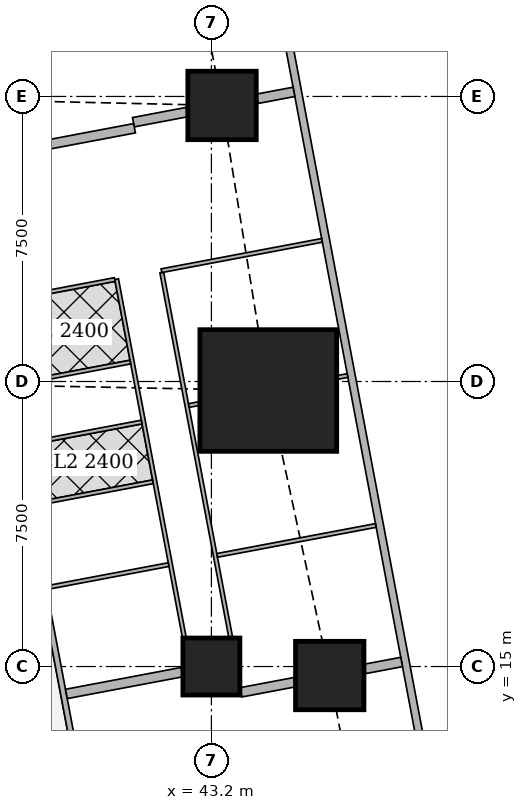
"""IFC4 building model, lengths in metres.
Left out: names, types, materials, properties, quantities, classifications, styles, units other than length and angle.
Written with IfcOpenShell. Run it as: python <this file> out.ifc"""

import sys

from ifc_helpers import new_model, si_unit, direction, frame, frame_2d, origin, origin_2d, place, context, subcontext, project, spatial, rectangle, extrude, element, fill, save


model = new_model("IFC4")
c1 = context("Model", 3, precision=1e-05, world=origin(), true_north=direction((0.0, 1.0)))
c2 = subcontext(c1, "Body", "Model", "MODEL_VIEW")
j1 = project(units=[si_unit("LENGTHUNIT", "METRE"), si_unit("PLANEANGLEUNIT", "RADIAN")], contexts=[c1])
p1 = place(None, origin())
s1 = spatial("IfcSite", under=j1, at=p1, CompositionType="ELEMENT")
p2 = place(p1, origin())
s2 = spatial("IfcBuilding", under=s1, at=p2, CompositionType="ELEMENT")
p3 = place(p2, frame((0.0, 0.0, 147.05)))
s3 = spatial("IfcBuildingStorey", under=s2, at=p3, CompositionType="ELEMENT", Elevation=147.05)
p4 = place(p3, frame((43.2, 15.0, 0.0), z_axis=(0.0, 0.0, 1.0), x_axis=(1.0, 0.0, 0.0)))
e1 = element("IfcColumn", 1, at=p4, inside=s3, PredefinedType="COLUMN", context=c2, shape_type="SweptSolid", body=[
    extrude(rectangle(XDim=1.5, YDim=1.5, at=origin_2d()), origin(), (0.0, 0.0, 1.0), 3.75),
])
p5 = place(p3, frame((46.314, 14.763, 0.0), z_axis=(0.0, 0.0, 1.0), x_axis=(1.0, 0.0, 0.0)))
e2 = element("IfcColumn", 2, at=p5, inside=s3, PredefinedType="COLUMN", context=c2, shape_type="SweptSolid", body=[
    extrude(rectangle(XDim=1.8, YDim=1.8, at=origin_2d()), origin(), (0.0, 0.0, 1.0), 3.75),
])
p6 = place(p3, frame((44.697, 22.263, 0.0), z_axis=(0.0, 0.0, 1.0), x_axis=(1.0, 0.0, 0.0)))
e3 = element("IfcColumn", 3, at=p6, inside=s3, PredefinedType="COLUMN", context=c2, shape_type="SweptSolid", body=[
    extrude(rectangle(XDim=3.6, YDim=3.2, at=origin_2d()), origin(), (0.0, 0.0, 1.0), 3.75),
])
p7 = place(p3, frame((43.48, 29.763, 0.0), z_axis=(0.0, 0.0, 1.0), x_axis=(1.0, 0.0, 0.0)))
e4 = element("IfcColumn", 4, at=p7, inside=s3, PredefinedType="COLUMN", context=c2, shape_type="SweptSolid", body=[
    extrude(rectangle(XDim=1.8, YDim=1.8, at=origin_2d()), origin(), (0.0, 0.0, 1.0), 3.75),
])
p8 = place(p3, frame((50.653, 2.703, 0.0), z_axis=(0.0, 0.0, 1.0), x_axis=(-0.185612026696, 0.982623109613, 0.0)))
e5 = element("IfcWall", 5, at=p8, inside=s3, PredefinedType="SOLIDWALL", context=c2, shape_type="SweptSolid", body=[
    extrude(rectangle(XDim=41.393, YDim=0.2, at=frame_2d((20.697, 0.0))), origin(), (0.0, 0.0, 1.0), 3.5),
])
p9 = place(p8, frame((1.633, 0.0, 0.9)))
e6 = element("IfcOpeningElement", 6, at=p9, cuts=e5, PredefinedType="OPENING", context=c2, shape_type="SweptSolid", body=[
    extrude(rectangle(XDim=1.8, YDim=1.5, at=frame_2d((0.9, 0.75))), frame((0.0, 0.11, 0.0), z_axis=(0.0, -1.0, 0.0), x_axis=(1.0, 0.0, 0.0)), (0.0, 0.0, 1.0), 0.22),
])
p10 = place(p8, frame((6.032, 0.0, 0.9)))
e7 = element("IfcOpeningElement", 7, at=p10, cuts=e5, PredefinedType="OPENING", context=c2, shape_type="SweptSolid", body=[
    extrude(rectangle(XDim=1.8, YDim=1.5, at=frame_2d((0.9, 0.75))), frame((0.0, 0.11, 0.0), z_axis=(0.0, -1.0, 0.0), x_axis=(1.0, 0.0, 0.0)), (0.0, 0.0, 1.0), 0.22),
])
p11 = place(p8, frame((9.848, 0.0, 0.9)))
e8 = element("IfcOpeningElement", 8, at=p11, cuts=e5, PredefinedType="OPENING", context=c2, shape_type="SweptSolid", body=[
    extrude(rectangle(XDim=1.8, YDim=1.5, at=frame_2d((0.9, 0.75))), frame((0.0, 0.11, 0.0), z_axis=(0.0, -1.0, 0.0), x_axis=(1.0, 0.0, 0.0)), (0.0, 0.0, 1.0), 0.22),
])
p12 = place(p8, frame((13.664, 0.0, 0.9)))
e9 = element("IfcOpeningElement", 9, at=p12, cuts=e5, PredefinedType="OPENING", context=c2, shape_type="SweptSolid", body=[
    extrude(rectangle(XDim=1.8, YDim=1.5, at=frame_2d((0.9, 0.75))), frame((0.0, 0.11, 0.0), z_axis=(0.0, -1.0, 0.0), x_axis=(1.0, 0.0, 0.0)), (0.0, 0.0, 1.0), 0.22),
])
p13 = place(p8, frame((17.481, 0.0, 0.9)))
e10 = element("IfcOpeningElement", 10, at=p13, cuts=e5, PredefinedType="OPENING", context=c2, shape_type="SweptSolid", body=[
    extrude(rectangle(XDim=1.8, YDim=1.5, at=frame_2d((0.9, 0.75))), frame((0.0, 0.11, 0.0), z_axis=(0.0, -1.0, 0.0), x_axis=(1.0, 0.0, 0.0)), (0.0, 0.0, 1.0), 0.22),
])
p14 = place(p8, frame((21.297, 0.0, 0.9)))
e11 = element("IfcOpeningElement", 11, at=p14, cuts=e5, PredefinedType="OPENING", context=c2, shape_type="SweptSolid", body=[
    extrude(rectangle(XDim=1.8, YDim=1.5, at=frame_2d((0.9, 0.75))), frame((0.0, 0.11, 0.0), z_axis=(0.0, -1.0, 0.0), x_axis=(1.0, 0.0, 0.0)), (0.0, 0.0, 1.0), 0.22),
])
p15 = place(p8, frame((25.113, 0.0, 0.9)))
e12 = element("IfcOpeningElement", 12, at=p15, cuts=e5, PredefinedType="OPENING", context=c2, shape_type="SweptSolid", body=[
    extrude(rectangle(XDim=1.8, YDim=1.5, at=frame_2d((0.9, 0.75))), frame((0.0, 0.11, 0.0), z_axis=(0.0, -1.0, 0.0), x_axis=(1.0, 0.0, 0.0)), (0.0, 0.0, 1.0), 0.22),
])
p16 = place(p8, frame((28.93, 0.0, 0.9)))
e13 = element("IfcOpeningElement", 13, at=p16, cuts=e5, PredefinedType="OPENING", context=c2, shape_type="SweptSolid", body=[
    extrude(rectangle(XDim=1.8, YDim=1.5, at=frame_2d((0.9, 0.75))), frame((0.0, 0.11, 0.0), z_axis=(0.0, -1.0, 0.0), x_axis=(1.0, 0.0, 0.0)), (0.0, 0.0, 1.0), 0.22),
])
p17 = place(p8, frame((32.746, 0.0, 0.9)))
e14 = element("IfcOpeningElement", 14, at=p17, cuts=e5, PredefinedType="OPENING", context=c2, shape_type="SweptSolid", body=[
    extrude(rectangle(XDim=1.8, YDim=1.5, at=frame_2d((0.9, 0.75))), frame((0.0, 0.11, 0.0), z_axis=(0.0, -1.0, 0.0), x_axis=(1.0, 0.0, 0.0)), (0.0, 0.0, 1.0), 0.22),
])
p18 = place(p8, frame((36.481, 0.0, 0.9)))
e15 = element("IfcOpeningElement", 15, at=p18, cuts=e5, PredefinedType="OPENING", context=c2, shape_type="SweptSolid", body=[
    extrude(rectangle(XDim=1.8, YDim=1.5, at=frame_2d((0.9, 0.75))), frame((0.0, 0.11, 0.0), z_axis=(0.0, -1.0, 0.0), x_axis=(1.0, 0.0, 0.0)), (0.0, 0.0, 1.0), 0.22),
])
p19 = place(p3, frame((33.877, 43.029, 0.0), z_axis=(0.0, 0.0, 1.0), x_axis=(0.185596841028, -0.98262597798, 0.0)))
e16 = element("IfcWall", 16, at=p19, inside=s3, PredefinedType="SOLIDWALL", context=c2, shape_type="SweptSolid", body=[
    extrude(rectangle(XDim=41.66, YDim=0.15, at=frame_2d((20.83, 0.0))), origin(), (0.0, 0.0, 1.0), 2.5),
])
p20 = place(p19, frame((12.57, 0.0, 0.0)))
e17 = element("IfcOpeningElement", 17, at=p20, cuts=e16, PredefinedType="OPENING", context=c2, shape_type="SweptSolid", body=[
    extrude(rectangle(XDim=1.0, YDim=2.1, at=frame_2d((0.5, 1.05))), frame((0.0, 0.085, 0.0), z_axis=(0.0, -1.0, 0.0), x_axis=(1.0, 0.0, 0.0)), (0.0, 0.0, 1.0), 0.17),
])
p21 = place(p19, frame((16.386, 0.0, 0.0)))
e18 = element("IfcOpeningElement", 18, at=p21, cuts=e16, PredefinedType="OPENING", context=c2, shape_type="SweptSolid", body=[
    extrude(rectangle(XDim=1.0, YDim=2.1, at=frame_2d((0.5, 1.05))), frame((0.0, 0.085, 0.0), z_axis=(0.0, -1.0, 0.0), x_axis=(1.0, 0.0, 0.0)), (0.0, 0.0, 1.0), 0.17),
])
p22 = place(p19, frame((31.166, 0.0, 0.0)))
e19 = element("IfcOpeningElement", 19, at=p22, cuts=e16, PredefinedType="OPENING", context=c2, shape_type="SweptSolid", body=[
    extrude(rectangle(XDim=1.0, YDim=2.1, at=frame_2d((0.5, 1.05))), frame((0.0, 0.085, 0.0), z_axis=(0.0, -1.0, 0.0), x_axis=(1.0, 0.0, 0.0)), (0.0, 0.0, 1.0), 0.17),
])
p23 = place(p3, frame((41.894, 25.366, 0.0), z_axis=(0.0, 0.0, 1.0), x_axis=(0.1856544654, -0.982615092229, 0.0)))
e20 = element("IfcWall", 20, at=p23, inside=s3, PredefinedType="PARTITIONING", context=c2, shape_type="SweptSolid", body=[
    extrude(rectangle(XDim=9.776, YDim=0.1, at=frame_2d((4.888, 0.0))), origin(), (0.0, 0.0, 1.0), 2.5),
])
p24 = place(p23, frame((0.151, 0.0, 0.0)))
e21 = element("IfcOpeningElement", 21, at=p24, cuts=e20, PredefinedType="OPENING", context=c2, shape_type="SweptSolid", body=[
    extrude(rectangle(XDim=0.9, YDim=2.1, at=frame_2d((0.45, 1.05))), frame((0.0, 0.06, 0.0), z_axis=(0.0, -1.0, 0.0), x_axis=(1.0, 0.0, 0.0)), (0.0, 0.0, 1.0), 0.12),
])
p25 = place(p23, frame((5.05, 0.0, 0.0)))
e22 = element("IfcOpeningElement", 22, at=p25, cuts=e20, PredefinedType="OPENING", context=c2, shape_type="SweptSolid", body=[
    extrude(rectangle(XDim=0.9, YDim=2.1, at=frame_2d((0.45, 1.05))), frame((0.0, 0.06, 0.0), z_axis=(0.0, -1.0, 0.0), x_axis=(1.0, 0.0, 0.0)), (0.0, 0.0, 1.0), 0.12),
])
p26 = place(p23, frame((7.783, 0.0, 0.0)))
e23 = element("IfcOpeningElement", 23, at=p26, cuts=e20, PredefinedType="OPENING", context=c2, shape_type="SweptSolid", body=[
    extrude(rectangle(XDim=0.9, YDim=2.1, at=frame_2d((0.45, 1.05))), frame((0.0, 0.06, 0.0), z_axis=(0.0, -1.0, 0.0), x_axis=(1.0, 0.0, 0.0)), (0.0, 0.0, 1.0), 0.12),
])
p27 = place(p3, frame((40.706, 25.192, 0.0), z_axis=(0.0, 0.0, 1.0), x_axis=(0.185610321375, -0.982623431737, 0.0)))
e24 = element("IfcWall", 24, at=p27, inside=s3, PredefinedType="PARTITIONING", context=c2, shape_type="SweptSolid", body=[
    extrude(rectangle(XDim=9.601, YDim=0.1, at=frame_2d((4.8, 0.0))), origin(), (0.0, 0.0, 1.0), 2.5),
])
p28 = place(p27, frame((0.655, 0.0, 0.0)))
e25 = element("IfcOpeningElement", 25, at=p28, cuts=e24, PredefinedType="OPENING", context=c2, shape_type="SweptSolid", body=[
    extrude(rectangle(XDim=0.9, YDim=2.1, at=frame_2d((0.45, 1.05))), frame((0.0, 0.06, 0.0), z_axis=(0.0, -1.0, 0.0), x_axis=(1.0, 0.0, 0.0)), (0.0, 0.0, 1.0), 0.12),
])
p29 = place(p27, frame((4.166, 0.0, 0.0)))
e26 = element("IfcOpeningElement", 26, at=p29, cuts=e24, PredefinedType="OPENING", context=c2, shape_type="SweptSolid", body=[
    extrude(rectangle(XDim=0.9, YDim=2.1, at=frame_2d((0.45, 1.05))), frame((0.0, 0.06, 0.0), z_axis=(0.0, -1.0, 0.0), x_axis=(1.0, 0.0, 0.0)), (0.0, 0.0, 1.0), 0.12),
])
p30 = place(p27, frame((2.563, 0.0, 0.0)))
e27 = element("IfcOpeningElement", 27, at=p30, cuts=e24, PredefinedType="OPENING", context=c2, shape_type="SweptSolid", body=[
    extrude(rectangle(XDim=0.9, YDim=2.1, at=frame_2d((0.45, 1.05))), frame((0.0, 0.06, 0.0), z_axis=(0.0, -1.0, 0.0), x_axis=(1.0, 0.0, 0.0)), (0.0, 0.0, 1.0), 0.12),
])
p31 = place(p27, frame((6.074, 0.0, 0.0)))
e28 = element("IfcOpeningElement", 28, at=p31, cuts=e24, PredefinedType="OPENING", context=c2, shape_type="SweptSolid", body=[
    extrude(rectangle(XDim=0.9, YDim=2.1, at=frame_2d((0.45, 1.05))), frame((0.0, 0.06, 0.0), z_axis=(0.0, -1.0, 0.0), x_axis=(1.0, 0.0, 0.0)), (0.0, 0.0, 1.0), 0.12),
])
p32 = place(p3, frame((46.11, 26.213, 0.0), z_axis=(0.0, 0.0, 1.0), x_axis=(-0.982633535512, -0.185556823879, 0.0)))
e29 = element("IfcWall", 29, at=p32, inside=s3, PredefinedType="PARTITIONING", context=c2, shape_type="SweptSolid", body=[
    extrude(rectangle(XDim=4.3, YDim=0.1, at=frame_2d((2.15, 0.0))), origin(), (0.0, 0.0, 1.0), 2.1),
])
p33 = place(p3, frame((46.782, 22.657, 0.0), z_axis=(0.0, 0.0, 1.0), x_axis=(-0.982574553168, -0.185868898601, 0.0)))
e30 = element("IfcWall", 30, at=p33, inside=s3, PredefinedType="PARTITIONING", context=c2, shape_type="SweptSolid", body=[
    extrude(rectangle(XDim=0.28, YDim=0.1, at=frame_2d((0.14, 0.0))), origin(), (0.0, 0.0, 1.0), 3.5),
])
p34 = place(p3, frame((42.887, 21.921, 0.0), z_axis=(0.0, 0.0, 1.0), x_axis=(-0.982688058078, -0.185267861514, 0.0)))
e31 = element("IfcWall", 31, at=p34, inside=s3, PredefinedType="PARTITIONING", context=c2, shape_type="SweptSolid", body=[
    extrude(rectangle(XDim=0.286, YDim=0.1, at=frame_2d((0.143, 0.0))), origin(), (0.0, 0.0, 1.0), 2.5),
])
p35 = place(p3, frame((47.527, 18.712, 0.0), z_axis=(0.0, 0.0, 1.0), x_axis=(-0.982665405803, -0.185387972203, 0.0)))
e32 = element("IfcWall", 32, at=p35, inside=s3, PredefinedType="PARTITIONING", context=c2, shape_type="SweptSolid", body=[
    extrude(rectangle(XDim=4.25, YDim=0.1, at=frame_2d((2.125, 0.0))), origin(), (0.0, 0.0, 1.0), 2.1),
])
for number, where, z_axis, x_axis in (
    (33, (40.657, 25.183, 0.0), (0.0, 0.0, 1.0), (-0.983, -0.186, 0.0)),
    (34, (41.365, 21.433, 0.0), (0.0, 0.0, 1.0), (-0.983, -0.186, 0.0)),
):
    element("IfcWall", number, at=place(p3, frame(where, z_axis=z_axis, x_axis=x_axis)), inside=s3, PredefinedType="PARTITIONING", context=c2, shape_type="SweptSolid", body=[
        extrude(rectangle(XDim=3.275, YDim=0.1, at=frame_2d((1.637, 0.0))), origin(), (0.0, 0.0, 1.0), 3.5),
    ])
p36 = place(p3, frame((42.073, 17.682, 0.0), z_axis=(0.0, 0.0, 1.0), x_axis=(-0.982610347627, -0.185679575441, 0.0)))
e35 = element("IfcWall", 35, at=p36, inside=s3, PredefinedType="PARTITIONING", context=c2, shape_type="SweptSolid", body=[
    extrude(rectangle(XDim=3.274, YDim=0.1, at=frame_2d((1.637, 0.0))), origin(), (0.0, 0.0, 1.0), 3.5),
])
p37 = place(p36, frame((1.2, 0.0, 0.0)))
e36 = element("IfcOpeningElement", 36, at=p37, cuts=e35, PredefinedType="OPENING", context=c2, shape_type="SweptSolid", body=[
    extrude(rectangle(XDim=0.9, YDim=2.1, at=frame_2d((0.45, 1.05))), frame((0.0, 0.06, 0.0), z_axis=(0.0, -1.0, 0.0), x_axis=(1.0, 0.0, 0.0)), (0.0, 0.0, 1.0), 0.12),
])
p38 = place(p3, frame((41.067, 23.011, 0.0), z_axis=(0.0, 0.0, 1.0), x_axis=(-0.982618057925, -0.185638768151, 0.0)))
e37 = element("IfcWall", 37, at=p38, inside=s3, PredefinedType="PARTITIONING", context=c2, shape_type="SweptSolid", body=[
    extrude(rectangle(XDim=3.275, YDim=0.1, at=frame_2d((1.637, 0.0))), origin(), (0.0, 0.0, 1.0), 2.5),
])
p39 = place(p3, frame((41.662, 19.861, 0.0), z_axis=(0.0, 0.0, 1.0), x_axis=(-0.982607026909, -0.185697147715, 0.0)))
e38 = element("IfcWall", 38, at=p39, inside=s3, PredefinedType="PARTITIONING", context=c2, shape_type="SweptSolid", body=[
    extrude(rectangle(XDim=3.275, YDim=0.1, at=frame_2d((1.637, 0.0))), origin(), (0.0, 0.0, 1.0), 3.5),
])
p40 = place(p3, frame((45.372, 30.121, 0.0), z_axis=(0.0, 0.0, 1.0), x_axis=(-0.982576361834, -0.185859337043, 0.0)))
e39 = element("IfcWall", 39, at=p40, inside=s3, PredefinedType="SOLIDWALL", context=c2, shape_type="SweptSolid", body=[
    extrude(rectangle(XDim=0.985, YDim=0.25, at=frame_2d((0.493, 0.0))), origin(), (0.0, 0.0, 1.0), 2.1),
])
p41 = place(p3, frame((42.556, 29.589, 0.0), z_axis=(0.0, 0.0, 1.0), x_axis=(-0.982502104561, -0.18625148196, 0.0)))
e40 = element("IfcWall", 40, at=p41, inside=s3, PredefinedType="SOLIDWALL", context=c2, shape_type="SweptSolid", body=[
    extrude(rectangle(XDim=1.434, YDim=0.25, at=frame_2d((0.717, 0.0))), origin(), (0.0, 0.0, 1.0), 2.1),
])
p42 = place(p3, frame((41.177, 29.164, 0.0), z_axis=(0.0, 0.0, 1.0), x_axis=(-0.982612837616, -0.185666398014, 0.0)))
e41 = element("IfcWall", 41, at=p42, inside=s3, PredefinedType="SOLIDWALL", context=c2, shape_type="SweptSolid", body=[
    extrude(rectangle(XDim=4.525, YDim=0.25, at=frame_2d((2.262, 0.0))), origin(), (0.0, 0.0, 1.0), 2.5),
])
p43 = place(p3, frame((48.206, 15.12, 0.0), z_axis=(0.0, 0.0, 1.0), x_axis=(-0.982576361834, -0.185859337043, 0.0)))
e42 = element("IfcWall", 42, at=p43, inside=s3, PredefinedType="SOLIDWALL", context=c2, shape_type="SweptSolid", body=[
    extrude(rectangle(XDim=0.985, YDim=0.25, at=frame_2d((0.493, 0.0))), origin(), (0.0, 0.0, 1.0), 2.1),
])
p44 = place(p3, frame((45.39, 14.588, 0.0), z_axis=(0.0, 0.0, 1.0), x_axis=(-0.982680951688, -0.18530555089, 0.0)))
e43 = element("IfcWall", 43, at=p44, inside=s3, PredefinedType="SOLIDWALL", context=c2, shape_type="SweptSolid", body=[
    extrude(rectangle(XDim=1.435, YDim=0.25, at=frame_2d((0.717, 0.0))), origin(), (0.0, 0.0, 1.0), 2.1),
])
p45 = place(p3, frame((42.426, 14.853, 0.0), z_axis=(0.0, 0.0, 1.0), x_axis=(-0.982660840416, -0.185412169809, 0.0)))
e44 = element("IfcWall", 44, at=p45, inside=s3, PredefinedType="SOLIDWALL", context=c2, shape_type="SweptSolid", body=[
    extrude(rectangle(XDim=3.096, YDim=0.25, at=frame_2d((1.548, 0.0))), origin(), (0.0, 0.0, 1.0), 3.5),
])
p46 = place(p11, origin())
e45 = element("IfcWindow", 45, at=p46, inside=s3, PartitioningType="SINGLE_PANEL", PredefinedType="WINDOW", context=c2, shape_type="SweptSolid", body=[
    extrude(rectangle(XDim=1.8, YDim=1.5, at=frame_2d((0.9, 0.75))), frame((0.0, 0.03, 0.0), z_axis=(0.0, -1.0, 0.0), x_axis=(1.0, 0.0, 0.0)), (0.0, 0.0, 1.0), 0.06),
])
fill(e8, e45)
p47 = place(p12, origin())
e46 = element("IfcWindow", 46, at=p47, inside=s3, PartitioningType="SINGLE_PANEL", PredefinedType="WINDOW", context=c2, shape_type="SweptSolid", body=[
    extrude(rectangle(XDim=1.8, YDim=1.5, at=frame_2d((0.9, 0.75))), frame((0.0, 0.03, 0.0), z_axis=(0.0, -1.0, 0.0), x_axis=(1.0, 0.0, 0.0)), (0.0, 0.0, 1.0), 0.06),
])
fill(e9, e46)
p48 = place(p13, origin())
e47 = element("IfcWindow", 47, at=p48, inside=s3, PartitioningType="SINGLE_PANEL", PredefinedType="WINDOW", context=c2, shape_type="SweptSolid", body=[
    extrude(rectangle(XDim=1.8, YDim=1.5, at=frame_2d((0.9, 0.75))), frame((0.0, 0.03, 0.0), z_axis=(0.0, -1.0, 0.0), x_axis=(1.0, 0.0, 0.0)), (0.0, 0.0, 1.0), 0.06),
])
fill(e10, e47)
p49 = place(p14, origin())
e48 = element("IfcWindow", 48, at=p49, inside=s3, PartitioningType="SINGLE_PANEL", PredefinedType="WINDOW", context=c2, shape_type="SweptSolid", body=[
    extrude(rectangle(XDim=1.8, YDim=1.5, at=frame_2d((0.9, 0.75))), frame((0.0, 0.03, 0.0), z_axis=(0.0, -1.0, 0.0), x_axis=(1.0, 0.0, 0.0)), (0.0, 0.0, 1.0), 0.06),
])
fill(e11, e48)
p50 = place(p15, origin())
e49 = element("IfcWindow", 49, at=p50, inside=s3, PartitioningType="SINGLE_PANEL", PredefinedType="WINDOW", context=c2, shape_type="SweptSolid", body=[
    extrude(rectangle(XDim=1.8, YDim=1.5, at=frame_2d((0.9, 0.75))), frame((0.0, 0.03, 0.0), z_axis=(0.0, -1.0, 0.0), x_axis=(1.0, 0.0, 0.0)), (0.0, 0.0, 1.0), 0.06),
])
fill(e12, e49)
p51 = place(p16, origin())
e50 = element("IfcWindow", 50, at=p51, inside=s3, PartitioningType="SINGLE_PANEL", PredefinedType="WINDOW", context=c2, shape_type="SweptSolid", body=[
    extrude(rectangle(XDim=1.8, YDim=1.5, at=frame_2d((0.9, 0.75))), frame((0.0, 0.03, 0.0), z_axis=(0.0, -1.0, 0.0), x_axis=(1.0, 0.0, 0.0)), (0.0, 0.0, 1.0), 0.06),
])
fill(e13, e50)
p52 = place(p24, origin())
e51 = element("IfcDoor", 51, at=p52, inside=s3, OperationType="SINGLE_SWING_LEFT", PredefinedType="DOOR", context=c2, shape_type="SweptSolid", body=[
    extrude(rectangle(XDim=0.9, YDim=2.1, at=frame_2d((0.45, 1.05))), frame((0.0, 0.025, 0.0), z_axis=(0.0, -1.0, 0.0), x_axis=(1.0, 0.0, 0.0)), (0.0, 0.0, 1.0), 0.05),
])
fill(e21, e51)
p53 = place(p25, origin())
e52 = element("IfcDoor", 52, at=p53, inside=s3, OperationType="SINGLE_SWING_LEFT", PredefinedType="DOOR", context=c2, shape_type="SweptSolid", body=[
    extrude(rectangle(XDim=0.9, YDim=2.1, at=frame_2d((0.45, 1.05))), frame((0.0, 0.025, 0.0), z_axis=(0.0, -1.0, 0.0), x_axis=(1.0, 0.0, 0.0)), (0.0, 0.0, 1.0), 0.05),
])
fill(e22, e52)
p54 = place(p26, origin())
e53 = element("IfcDoor", 53, at=p54, inside=s3, OperationType="SINGLE_SWING_LEFT", PredefinedType="DOOR", context=c2, shape_type="SweptSolid", body=[
    extrude(rectangle(XDim=0.9, YDim=2.1, at=frame_2d((0.45, 1.05))), frame((0.0, 0.025, 0.0), z_axis=(0.0, -1.0, 0.0), x_axis=(1.0, 0.0, 0.0)), (0.0, 0.0, 1.0), 0.05),
])
fill(e23, e53)
p55 = place(p28, origin())
e54 = element("IfcDoor", 54, at=p55, inside=s3, OperationType="SINGLE_SWING_RIGHT", PredefinedType="DOOR", context=c2, shape_type="SweptSolid", body=[
    extrude(rectangle(XDim=0.9, YDim=2.1, at=frame_2d((0.45, 1.05))), frame((0.0, 0.025, 0.0), z_axis=(0.0, -1.0, 0.0), x_axis=(1.0, 0.0, 0.0)), (0.0, 0.0, 1.0), 0.05),
])
fill(e25, e54)
p56 = place(p29, origin())
e55 = element("IfcDoor", 55, at=p56, inside=s3, OperationType="SINGLE_SWING_RIGHT", PredefinedType="DOOR", context=c2, shape_type="SweptSolid", body=[
    extrude(rectangle(XDim=0.9, YDim=2.1, at=frame_2d((0.45, 1.05))), frame((0.0, 0.025, 0.0), z_axis=(0.0, -1.0, 0.0), x_axis=(1.0, 0.0, 0.0)), (0.0, 0.0, 1.0), 0.05),
])
fill(e26, e55)
p57 = place(p30, origin())
e56 = element("IfcDoor", 56, at=p57, inside=s3, OperationType="SINGLE_SWING_RIGHT", PredefinedType="DOOR", context=c2, shape_type="SweptSolid", body=[
    extrude(rectangle(XDim=0.9, YDim=2.1, at=frame_2d((0.45, 1.05))), frame((0.0, 0.025, 0.0), z_axis=(0.0, -1.0, 0.0), x_axis=(1.0, 0.0, 0.0)), (0.0, 0.0, 1.0), 0.05),
])
fill(e27, e56)
p58 = place(p31, origin())
e57 = element("IfcDoor", 57, at=p58, inside=s3, OperationType="SINGLE_SWING_LEFT", PredefinedType="DOOR", context=c2, shape_type="SweptSolid", body=[
    extrude(rectangle(XDim=0.9, YDim=2.1, at=frame_2d((0.45, 1.05))), frame((0.0, 0.025, 0.0), z_axis=(0.0, -1.0, 0.0), x_axis=(1.0, 0.0, 0.0)), (0.0, 0.0, 1.0), 0.05),
])
fill(e28, e57)
p59 = place(p37, origin())
e58 = element("IfcDoor", 58, at=p59, inside=s3, OperationType="SINGLE_SWING_RIGHT", PredefinedType="DOOR", context=c2, shape_type="SweptSolid", body=[
    extrude(rectangle(XDim=0.9, YDim=2.1, at=frame_2d((0.45, 1.05))), frame((0.0, 0.025, 0.0), z_axis=(0.0, -1.0, 0.0), x_axis=(1.0, 0.0, 0.0)), (0.0, 0.0, 1.0), 0.05),
])
fill(e36, e58)
save(model, sys.argv[1])
